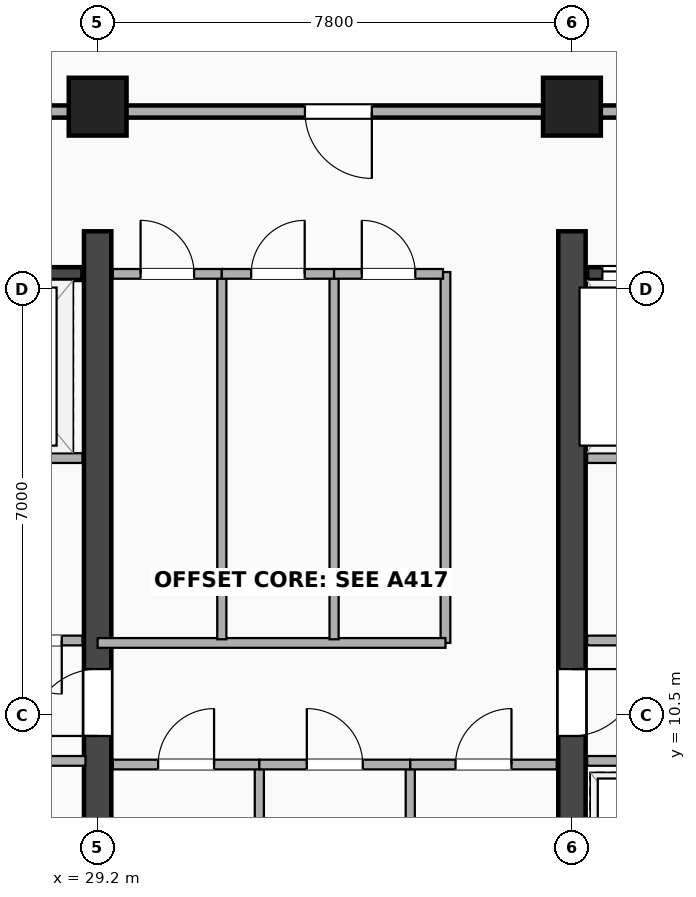
"""IFC4 building model, lengths in metres.
Left out: names, types, materials, properties, quantities, classifications, styles, units other than length and angle.
Written with IfcOpenShell. Run it as: python <this file> out.ifc"""

import sys

from ifc_helpers import new_model, si_unit, direction, frame, frame_2d, origin, origin_2d, place, context, subcontext, project, spatial, rectangle, extrude, element, fill, save


model = new_model("IFC4")
c1 = context("Model", 3, precision=1e-05, world=origin(), true_north=direction((0.0, 1.0)))
c2 = subcontext(c1, "Body", "Model", "MODEL_VIEW")
j1 = project(units=[si_unit("LENGTHUNIT", "METRE"), si_unit("PLANEANGLEUNIT", "RADIAN")], contexts=[c1])
p1 = place(None, origin())
s1 = spatial("IfcSite", under=j1, at=p1, CompositionType="ELEMENT")
p2 = place(p1, origin())
s2 = spatial("IfcBuilding", under=s1, at=p2, CompositionType="ELEMENT")
p3 = place(p2, frame((0.0, 0.0, 224.9)))
s3 = spatial("IfcBuildingStorey", under=s2, at=p3, CompositionType="ELEMENT", Elevation=224.9)
p4 = place(p3, frame((29.2, 3.5, 0.0), z_axis=(0.0, 0.0, 1.0), x_axis=(0.0, 1.0, 0.0)))
e1 = element("IfcWall", 1, at=p4, inside=s3, PredefinedType="SHEAR", context=c2, shape_type="SweptSolid", body=[
    extrude(rectangle(XDim=14.95, YDim=0.45, at=frame_2d((7.475, 0.0))), origin(), (0.0, 0.0, 1.0), 3.26),
])
p5 = place(p4, frame((7.75, 0.0, 0.0), z_axis=(0.0, 0.0, 1.0), x_axis=(-1.0, 0.0, 0.0)))
e2 = element("IfcOpeningElement", 2, at=p5, cuts=e1, PredefinedType="OPENING", context=c2, shape_type="SweptSolid", body=[
    extrude(rectangle(XDim=1.1, YDim=2.15, at=frame_2d((0.55, 1.075))), frame((0.0, 0.235, 0.0), z_axis=(0.0, -1.0, 0.0), x_axis=(1.0, 0.0, 0.0)), (0.0, 0.0, 1.0), 0.47),
])
p6 = place(p3, frame((37.0, 3.5, 0.0), z_axis=(0.0, 0.0, 1.0), x_axis=(0.0, 1.0, 0.0)))
e3 = element("IfcWall", 3, at=p6, inside=s3, PredefinedType="SHEAR", context=c2, shape_type="SweptSolid", body=[
    extrude(rectangle(XDim=14.95, YDim=0.45, at=frame_2d((7.475, 0.0))), origin(), (0.0, 0.0, 1.0), 3.26),
])
p7 = place(p6, frame((6.65, 0.0, 0.0)))
e4 = element("IfcOpeningElement", 4, at=p7, cuts=e3, PredefinedType="OPENING", context=c2, shape_type="SweptSolid", body=[
    extrude(rectangle(XDim=1.1, YDim=2.15, at=frame_2d((0.55, 1.075))), frame((0.0, 0.235, 0.0), z_axis=(0.0, -1.0, 0.0), x_axis=(1.0, 0.0, 0.0)), (0.0, 0.0, 1.0), 0.47),
])
p8 = place(p3, frame((20.65, 17.755, 0.0), z_axis=(0.0, 0.0, 1.0), x_axis=(1.0, 0.0, 0.0)))
e5 = element("IfcWall", 5, at=p8, inside=s3, PredefinedType="SHEAR", context=c2, shape_type="SweptSolid", body=[
    extrude(rectangle(XDim=8.3, YDim=0.21, at=frame_2d((4.15, 0.0))), origin(), (0.0, 0.0, 1.0), 3.26),
])
p9 = place(p8, frame((2.2, 0.0, 0.0), z_axis=(0.0, 0.0, 1.0), x_axis=(-1.0, 0.0, 0.0)))
e6 = element("IfcOpeningElement", 6, at=p9, cuts=e5, PredefinedType="OPENING", context=c2, shape_type="SweptSolid", body=[
    extrude(rectangle(XDim=1.05, YDim=2.15, at=frame_2d((0.525, 1.075))), frame((0.0, 0.115, 0.0), z_axis=(0.0, -1.0, 0.0), x_axis=(1.0, 0.0, 0.0)), (0.0, 0.0, 1.0), 0.23),
])
p10 = place(p8, frame((4.15, 0.0, 0.0)))
e7 = element("IfcOpeningElement", 7, at=p10, cuts=e5, PredefinedType="OPENING", context=c2, shape_type="SweptSolid", body=[
    extrude(rectangle(XDim=1.1, YDim=2.18, at=frame_2d((0.55, 1.09))), frame((0.0, 0.115, 0.0), z_axis=(0.0, -1.0, 0.0), x_axis=(1.0, 0.0, 0.0)), (0.0, 0.0, 1.0), 0.23),
])
p11 = place(p8, frame((6.45, 0.0, 0.0)))
e8 = element("IfcOpeningElement", 8, at=p11, cuts=e5, PredefinedType="OPENING", context=c2, shape_type="SweptSolid", body=[
    extrude(rectangle(XDim=1.12, YDim=2.2, at=frame_2d((0.56, 1.1))), frame((0.0, 0.115, 0.0), z_axis=(0.0, -1.0, 0.0), x_axis=(1.0, 0.0, 0.0)), (0.0, 0.0, 1.0), 0.23),
])
p12 = place(p3, frame((37.25, 17.755, 0.0), z_axis=(0.0, 0.0, 1.0), x_axis=(1.0, 0.0, 0.0)))
e9 = element("IfcWall", 9, at=p12, inside=s3, PredefinedType="SHEAR", context=c2, shape_type="SweptSolid", body=[
    extrude(rectangle(XDim=7.2, YDim=0.21, at=frame_2d((3.6, 0.0))), origin(), (0.0, 0.0, 1.0), 3.26),
])
p13 = place(p12, frame((0.25, 0.0, 0.0)))
e10 = element("IfcOpeningElement", 10, at=p13, cuts=e9, PredefinedType="OPENING", context=c2, shape_type="SweptSolid", body=[
    extrude(rectangle(XDim=1.12, YDim=2.2, at=frame_2d((0.56, 1.1))), frame((0.0, 0.115, 0.0), z_axis=(0.0, -1.0, 0.0), x_axis=(1.0, 0.0, 0.0)), (0.0, 0.0, 1.0), 0.23),
])
p14 = place(p12, frame((2.05, 0.0, 0.0)))
e11 = element("IfcOpeningElement", 11, at=p14, cuts=e9, PredefinedType="OPENING", context=c2, shape_type="SweptSolid", body=[
    extrude(rectangle(XDim=1.1, YDim=2.18, at=frame_2d((0.55, 1.09))), frame((0.0, 0.115, 0.0), z_axis=(0.0, -1.0, 0.0), x_axis=(1.0, 0.0, 0.0)), (0.0, 0.0, 1.0), 0.23),
])
p15 = place(p12, frame((5.78, 0.0, 0.0), z_axis=(0.0, 0.0, 1.0), x_axis=(-1.0, 0.0, 0.0)))
e12 = element("IfcOpeningElement", 12, at=p15, cuts=e9, PredefinedType="OPENING", context=c2, shape_type="SweptSolid", body=[
    extrude(rectangle(XDim=1.05, YDim=2.15, at=frame_2d((0.525, 1.075))), frame((0.0, 0.115, 0.0), z_axis=(0.0, -1.0, 0.0), x_axis=(1.0, 0.0, 0.0)), (0.0, 0.0, 1.0), 0.23),
])
for number, where, z_axis, x_axis in (
    (13, (29.2, 20.5, -0.24), (0.0, 0.0, 1.0), (1.0, 0.0, 0.0)),
    (14, (37.0, 20.5, -0.24), (0.0, 0.0, 1.0), (1.0, 0.0, 0.0)),
):
    element("IfcColumn", number, at=place(p3, frame(where, z_axis=z_axis, x_axis=x_axis)), inside=s3, PredefinedType="COLUMN", context=c2, shape_type="SweptSolid", body=[
        extrude(rectangle(XDim=0.95, YDim=0.95, at=origin_2d()), origin(), (0.0, 0.0, 1.0), 3.5),
    ])
p16 = place(p3, frame((24.22, 14.72, 0.0), z_axis=(0.0, 0.0, 1.0), x_axis=(1.0, 0.0, 0.0)))
e15 = element("IfcWall", 15, at=p16, inside=s3, PredefinedType="PARTITIONING", context=c2, shape_type="SweptSolid", body=[
    extrude(rectangle(XDim=4.73, YDim=0.16, at=frame_2d((2.365, 0.0))), origin(), (0.0, 0.0, 1.0), 3.26),
])
p17 = place(p3, frame((37.25, 14.72, 0.0), z_axis=(0.0, 0.0, 1.0), x_axis=(1.0, 0.0, 0.0)))
e16 = element("IfcWall", 16, at=p17, inside=s3, PredefinedType="PARTITIONING", context=c2, shape_type="SweptSolid", body=[
    extrude(rectangle(XDim=3.61, YDim=0.16, at=frame_2d((1.805, 0.0))), origin(), (0.0, 0.0, 1.0), 3.26),
])
p18 = place(p3, frame((26.38, 20.42, 0.0), z_axis=(0.0, 0.0, 1.0), x_axis=(1.0, 0.0, 0.0)))
e17 = element("IfcWall", 17, at=p18, inside=s3, PredefinedType="PARTITIONING", context=c2, shape_type="SweptSolid", body=[
    extrude(rectangle(XDim=2.82, YDim=0.2, at=frame_2d((1.41, 0.0))), origin(), (0.0, 0.0, 1.0), 2.472),
])
p19 = place(p3, frame((29.2, 20.42, 0.0), z_axis=(0.0, 0.0, 1.0), x_axis=(1.0, 0.0, 0.0)))
e18 = element("IfcWall", 18, at=p19, inside=s3, PredefinedType="PARTITIONING", context=c2, shape_type="SweptSolid", body=[
    extrude(rectangle(XDim=7.8, YDim=0.2, at=frame_2d((3.9, 0.0))), origin(), (0.0, 0.0, 1.0), 2.472),
])
p20 = place(p19, frame((3.409, 0.0, 0.0)))
e19 = element("IfcOpeningElement", 19, at=p20, cuts=e18, PredefinedType="OPENING", context=c2, shape_type="SweptSolid", body=[
    extrude(rectangle(XDim=1.1, YDim=2.15, at=frame_2d((0.55, 1.075))), frame((0.0, 0.11, 0.0), z_axis=(0.0, -1.0, 0.0), x_axis=(1.0, 0.0, 0.0)), (0.0, 0.0, 1.0), 0.22),
])
p21 = place(p3, frame((37.0, 20.42, 0.0), z_axis=(0.0, 0.0, 1.0), x_axis=(1.0, 0.0, 0.0)))
e20 = element("IfcWall", 20, at=p21, inside=s3, PredefinedType="PARTITIONING", context=c2, shape_type="SweptSolid", body=[
    extrude(rectangle(XDim=7.45, YDim=0.2, at=frame_2d((3.725, 0.0))), origin(), (0.0, 0.0, 1.0), 2.472),
])
p22 = place(p21, frame((4.2, 0.0, 0.0)))
e21 = element("IfcOpeningElement", 21, at=p22, cuts=e20, PredefinedType="OPENING", context=c2, shape_type="SweptSolid", body=[
    extrude(rectangle(XDim=1.1, YDim=2.15, at=frame_2d((0.55, 1.075))), frame((0.0, 0.11, 0.0), z_axis=(0.0, -1.0, 0.0), x_axis=(1.0, 0.0, 0.0)), (0.0, 0.0, 1.0), 0.22),
])
p23 = place(p3, frame((27.389, 11.72, 0.0), z_axis=(0.0, 0.0, 1.0), x_axis=(1.0, 0.0, 0.0)))
e22 = element("IfcWall", 22, at=p23, inside=s3, PredefinedType="PARTITIONING", context=c2, shape_type="SweptSolid", body=[
    extrude(rectangle(XDim=1.561, YDim=0.16, at=frame_2d((0.78, 0.0))), origin(), (0.0, 0.0, 1.0), 3.26),
])
p24 = place(p23, frame((0.341, 0.0, 0.0)))
e23 = element("IfcOpeningElement", 23, at=p24, cuts=e22, PredefinedType="OPENING", context=c2, shape_type="SweptSolid", body=[
    extrude(rectangle(XDim=0.88, YDim=2.08, at=frame_2d((0.44, 1.04))), frame((0.0, 0.09, 0.0), z_axis=(0.0, -1.0, 0.0), x_axis=(1.0, 0.0, 0.0)), (0.0, 0.0, 1.0), 0.18),
])
p25 = place(p3, frame((37.25, 11.72, 0.0), z_axis=(0.0, 0.0, 1.0), x_axis=(1.0, 0.0, 0.0)))
e24 = element("IfcWall", 24, at=p25, inside=s3, PredefinedType="PARTITIONING", context=c2, shape_type="SweptSolid", body=[
    extrude(rectangle(XDim=3.61, YDim=0.16, at=frame_2d((1.805, 0.0))), origin(), (0.0, 0.0, 1.0), 3.26),
])
p26 = place(p25, frame((1.345, 0.0, 0.0)))
e25 = element("IfcOpeningElement", 25, at=p26, cuts=e24, PredefinedType="OPENING", context=c2, shape_type="SweptSolid", body=[
    extrude(rectangle(XDim=0.92, YDim=2.08, at=frame_2d((0.46, 1.04))), frame((0.0, 0.09, 0.0), z_axis=(0.0, -1.0, 0.0), x_axis=(1.0, 0.0, 0.0)), (0.0, 0.0, 1.0), 0.18),
])
p27 = place(p3, frame((24.2, 9.74, 0.0), z_axis=(0.0, 0.0, 1.0), x_axis=(1.0, 0.0, 0.0)))
e26 = element("IfcWall", 26, at=p27, inside=s3, PredefinedType="PARTITIONING", context=c2, shape_type="SweptSolid", body=[
    extrude(rectangle(XDim=4.8, YDim=0.16, at=frame_2d((2.4, 0.0))), origin(), (0.0, 0.0, 1.0), 3.26),
])
p28 = place(p27, frame((1.85, 0.0, 0.0)))
e27 = element("IfcOpeningElement", 27, at=p28, cuts=e26, PredefinedType="OPENING", context=c2, shape_type="SweptSolid", body=[
    extrude(rectangle(XDim=1.1, YDim=2.15, at=frame_2d((0.55, 1.075))), frame((0.0, 0.09, 0.0), z_axis=(0.0, -1.0, 0.0), x_axis=(1.0, 0.0, 0.0)), (0.0, 0.0, 1.0), 0.18),
])
p29 = place(p3, frame((37.25, 9.74, 0.0), z_axis=(0.0, 0.0, 1.0), x_axis=(1.0, 0.0, 0.0)))
e28 = element("IfcWall", 28, at=p29, inside=s3, PredefinedType="PARTITIONING", context=c2, shape_type="SweptSolid", body=[
    extrude(rectangle(XDim=2.17, YDim=0.16, at=frame_2d((1.085, 0.0))), origin(), (0.0, 0.0, 1.0), 3.26),
])
p30 = place(p3, frame((34.92, 11.68, 0.0), z_axis=(0.0, 0.0, 1.0), x_axis=(0.0, 1.0, 0.0)))
e29 = element("IfcWall", 29, at=p30, inside=s3, PredefinedType="PARTITIONING", context=c2, shape_type="SweptSolid", body=[
    extrude(rectangle(XDim=6.1, YDim=0.16, at=frame_2d((3.05, 0.0))), origin(), (0.0, 0.0, 1.0), 3.26),
])
p31 = place(p3, frame((31.859, 3.95, 0.0), z_axis=(0.0, 0.0, 1.0), x_axis=(0.0, 1.0, 0.0)))
e30 = element("IfcWall", 30, at=p31, inside=s3, PredefinedType="PARTITIONING", context=c2, shape_type="SweptSolid", body=[
    extrude(rectangle(XDim=5.73, YDim=0.15, at=frame_2d((2.865, 0.0))), origin(), (0.0, 0.0, 1.0), 3.26),
])
p32 = place(p3, frame((29.45, 9.68, 0.0), z_axis=(0.0, 0.0, 1.0), x_axis=(1.0, 0.0, 0.0)))
e31 = element("IfcWall", 31, at=p32, inside=s3, PredefinedType="PARTITIONING", context=c2, shape_type="SweptSolid", body=[
    extrude(rectangle(XDim=2.409, YDim=0.16, at=frame_2d((1.205, 0.0))), origin(), (0.0, 0.0, 1.0), 3.26),
])
p33 = place(p32, frame((1.664, 0.0, 0.0), z_axis=(0.0, 0.0, 1.0), x_axis=(-1.0, 0.0, 0.0)))
e32 = element("IfcOpeningElement", 32, at=p33, cuts=e31, PredefinedType="OPENING", context=c2, shape_type="SweptSolid", body=[
    extrude(rectangle(XDim=0.92, YDim=2.08, at=frame_2d((0.46, 1.04))), frame((0.0, 0.09, 0.0), z_axis=(0.0, -1.0, 0.0), x_axis=(1.0, 0.0, 0.0)), (0.0, 0.0, 1.0), 0.18),
])
p34 = place(p3, frame((34.341, 3.95, 0.0), z_axis=(0.0, 0.0, 1.0), x_axis=(0.0, 1.0, 0.0)))
e33 = element("IfcWall", 33, at=p34, inside=s3, PredefinedType="PARTITIONING", context=c2, shape_type="SweptSolid", body=[
    extrude(rectangle(XDim=5.73, YDim=0.15, at=frame_2d((2.865, 0.0))), origin(), (0.0, 0.0, 1.0), 3.26),
])
p35 = place(p3, frame((31.859, 9.68, 0.0), z_axis=(0.0, 0.0, 1.0), x_axis=(1.0, 0.0, 0.0)))
e34 = element("IfcWall", 34, at=p35, inside=s3, PredefinedType="PARTITIONING", context=c2, shape_type="SweptSolid", body=[
    extrude(rectangle(XDim=2.482, YDim=0.16, at=frame_2d((1.241, 0.0))), origin(), (0.0, 0.0, 1.0), 3.26),
])
p36 = place(p35, frame((1.701, 0.0, 0.0), z_axis=(0.0, 0.0, 1.0), x_axis=(-1.0, 0.0, 0.0)))
e35 = element("IfcOpeningElement", 35, at=p36, cuts=e34, PredefinedType="OPENING", context=c2, shape_type="SweptSolid", body=[
    extrude(rectangle(XDim=0.92, YDim=2.08, at=frame_2d((0.46, 1.04))), frame((0.0, 0.09, 0.0), z_axis=(0.0, -1.0, 0.0), x_axis=(1.0, 0.0, 0.0)), (0.0, 0.0, 1.0), 0.18),
])
p37 = place(p3, frame((34.341, 9.68, 0.0), z_axis=(0.0, 0.0, 1.0), x_axis=(1.0, 0.0, 0.0)))
e36 = element("IfcWall", 36, at=p37, inside=s3, PredefinedType="PARTITIONING", context=c2, shape_type="SweptSolid", body=[
    extrude(rectangle(XDim=2.409, YDim=0.16, at=frame_2d((1.205, 0.0))), origin(), (0.0, 0.0, 1.0), 3.26),
])
p38 = place(p37, frame((1.664, 0.0, 0.0), z_axis=(0.0, 0.0, 1.0), x_axis=(-1.0, 0.0, 0.0)))
e37 = element("IfcOpeningElement", 37, at=p38, cuts=e36, PredefinedType="OPENING", context=c2, shape_type="SweptSolid", body=[
    extrude(rectangle(XDim=0.92, YDim=2.08, at=frame_2d((0.46, 1.04))), frame((0.0, 0.09, 0.0), z_axis=(0.0, -1.0, 0.0), x_axis=(1.0, 0.0, 0.0)), (0.0, 0.0, 1.0), 0.18),
])
p39 = place(p3, frame((29.2, 11.68, 0.0), z_axis=(0.0, 0.0, 1.0), x_axis=(1.0, 0.0, 0.0)))
e38 = element("IfcWall", 38, at=p39, inside=s3, PredefinedType="PARTITIONING", context=c2, shape_type="SweptSolid", body=[
    extrude(rectangle(XDim=5.72, YDim=0.16, at=frame_2d((2.86, 0.0))), origin(), (0.0, 0.0, 1.0), 3.26),
])
p40 = place(p3, frame((31.242, 11.74, 0.0), z_axis=(0.0, 0.0, 1.0), x_axis=(0.0, 1.0, 0.0)))
e39 = element("IfcWall", 39, at=p40, inside=s3, PredefinedType="PARTITIONING", context=c2, shape_type="SweptSolid", body=[
    extrude(rectangle(XDim=6.01, YDim=0.15, at=frame_2d((3.005, 0.0))), origin(), (0.0, 0.0, 1.0), 3.26),
])
p41 = place(p3, frame((29.45, 17.75, 0.0), z_axis=(0.0, 0.0, 1.0), x_axis=(1.0, 0.0, 0.0)))
e40 = element("IfcWall", 40, at=p41, inside=s3, PredefinedType="PARTITIONING", context=c2, shape_type="SweptSolid", body=[
    extrude(rectangle(XDim=1.792, YDim=0.16, at=frame_2d((0.896, 0.0))), origin(), (0.0, 0.0, 1.0), 3.26),
])
p42 = place(p41, frame((1.336, 0.0, 0.0), z_axis=(0.0, 0.0, 1.0), x_axis=(-1.0, 0.0, 0.0)))
e41 = element("IfcOpeningElement", 41, at=p42, cuts=e40, PredefinedType="OPENING", context=c2, shape_type="SweptSolid", body=[
    extrude(rectangle(XDim=0.88, YDim=2.08, at=frame_2d((0.44, 1.04))), frame((0.0, 0.09, 0.0), z_axis=(0.0, -1.0, 0.0), x_axis=(1.0, 0.0, 0.0)), (0.0, 0.0, 1.0), 0.18),
])
p43 = place(p3, frame((33.088, 11.74, 0.0), z_axis=(0.0, 0.0, 1.0), x_axis=(0.0, 1.0, 0.0)))
e42 = element("IfcWall", 42, at=p43, inside=s3, PredefinedType="PARTITIONING", context=c2, shape_type="SweptSolid", body=[
    extrude(rectangle(XDim=6.01, YDim=0.15, at=frame_2d((3.005, 0.0))), origin(), (0.0, 0.0, 1.0), 3.26),
])
p44 = place(p3, frame((31.242, 17.75, 0.0), z_axis=(0.0, 0.0, 1.0), x_axis=(1.0, 0.0, 0.0)))
e43 = element("IfcWall", 43, at=p44, inside=s3, PredefinedType="PARTITIONING", context=c2, shape_type="SweptSolid", body=[
    extrude(rectangle(XDim=1.846, YDim=0.16, at=frame_2d((0.923, 0.0))), origin(), (0.0, 0.0, 1.0), 3.26),
])
p45 = place(p44, frame((1.363, 0.0, 0.0), z_axis=(0.0, 0.0, 1.0), x_axis=(-1.0, 0.0, 0.0)))
e44 = element("IfcOpeningElement", 44, at=p45, cuts=e43, PredefinedType="OPENING", context=c2, shape_type="SweptSolid", body=[
    extrude(rectangle(XDim=0.88, YDim=2.08, at=frame_2d((0.44, 1.04))), frame((0.0, 0.09, 0.0), z_axis=(0.0, -1.0, 0.0), x_axis=(1.0, 0.0, 0.0)), (0.0, 0.0, 1.0), 0.18),
])
p46 = place(p3, frame((33.088, 17.75, 0.0), z_axis=(0.0, 0.0, 1.0), x_axis=(1.0, 0.0, 0.0)))
e45 = element("IfcWall", 45, at=p46, inside=s3, PredefinedType="PARTITIONING", context=c2, shape_type="SweptSolid", body=[
    extrude(rectangle(XDim=1.792, YDim=0.16, at=frame_2d((0.896, 0.0))), origin(), (0.0, 0.0, 1.0), 3.26),
])
p47 = place(p46, frame((1.336, 0.0, 0.0), z_axis=(0.0, 0.0, 1.0), x_axis=(-1.0, 0.0, 0.0)))
e46 = element("IfcOpeningElement", 46, at=p47, cuts=e45, PredefinedType="OPENING", context=c2, shape_type="SweptSolid", body=[
    extrude(rectangle(XDim=0.88, YDim=2.08, at=frame_2d((0.44, 1.04))), frame((0.0, 0.09, 0.0), z_axis=(0.0, -1.0, 0.0), x_axis=(1.0, 0.0, 0.0)), (0.0, 0.0, 1.0), 0.18),
])
p48 = place(p13, origin())
e47 = element("IfcDoor", 47, at=p48, inside=s3, OperationType="DOUBLE_DOOR_SLIDING", PredefinedType="DOOR", context=c2, shape_type="SweptSolid", body=[
    extrude(rectangle(XDim=1.12, YDim=2.2, at=frame_2d((0.56, 1.1))), frame((0.0, 0.025, 0.0), z_axis=(0.0, -1.0, 0.0), x_axis=(1.0, 0.0, 0.0)), (0.0, 0.0, 1.0), 0.05),
])
fill(e10, e47)
p49 = place(p5, origin())
e48 = element("IfcDoor", 48, at=p49, inside=s3, OperationType="SINGLE_SWING_LEFT", PredefinedType="DOOR", context=c2, shape_type="SweptSolid", body=[
    extrude(rectangle(XDim=1.1, YDim=2.15, at=frame_2d((0.55, 1.075))), frame((0.0, 0.025, 0.0), z_axis=(0.0, -1.0, 0.0), x_axis=(1.0, 0.0, 0.0)), (0.0, 0.0, 1.0), 0.05),
])
fill(e2, e48)
p50 = place(p7, origin())
e49 = element("IfcDoor", 49, at=p50, inside=s3, OperationType="SINGLE_SWING_RIGHT", PredefinedType="DOOR", context=c2, shape_type="SweptSolid", body=[
    extrude(rectangle(XDim=1.1, YDim=2.15, at=frame_2d((0.55, 1.075))), frame((0.0, 0.025, 0.0), z_axis=(0.0, -1.0, 0.0), x_axis=(1.0, 0.0, 0.0)), (0.0, 0.0, 1.0), 0.05),
])
fill(e4, e49)
p51 = place(p20, origin())
e50 = element("IfcDoor", 50, at=p51, inside=s3, OperationType="SINGLE_SWING_RIGHT", PredefinedType="DOOR", context=c2, shape_type="SweptSolid", body=[
    extrude(rectangle(XDim=1.1, YDim=2.15, at=frame_2d((0.55, 1.075))), frame((0.0, 0.025, 0.0), z_axis=(0.0, -1.0, 0.0), x_axis=(1.0, 0.0, 0.0)), (0.0, 0.0, 1.0), 0.05),
])
fill(e19, e50)
p52 = place(p24, origin())
e51 = element("IfcDoor", 51, at=p52, inside=s3, OperationType="SINGLE_SWING_RIGHT", PredefinedType="DOOR", context=c2, shape_type="SweptSolid", body=[
    extrude(rectangle(XDim=0.88, YDim=2.08, at=frame_2d((0.44, 1.04))), frame((0.0, 0.025, 0.0), z_axis=(0.0, -1.0, 0.0), x_axis=(1.0, 0.0, 0.0)), (0.0, 0.0, 1.0), 0.05),
])
fill(e23, e51)
p53 = place(p33, origin())
e52 = element("IfcDoor", 52, at=p53, inside=s3, OperationType="SINGLE_SWING_RIGHT", PredefinedType="DOOR", context=c2, shape_type="SweptSolid", body=[
    extrude(rectangle(XDim=0.92, YDim=2.08, at=frame_2d((0.46, 1.04))), frame((0.0, 0.025, 0.0), z_axis=(0.0, -1.0, 0.0), x_axis=(1.0, 0.0, 0.0)), (0.0, 0.0, 1.0), 0.05),
])
fill(e32, e52)
p54 = place(p36, origin())
e53 = element("IfcDoor", 53, at=p54, inside=s3, OperationType="SINGLE_SWING_LEFT", PredefinedType="DOOR", context=c2, shape_type="SweptSolid", body=[
    extrude(rectangle(XDim=0.92, YDim=2.08, at=frame_2d((0.46, 1.04))), frame((0.0, 0.025, 0.0), z_axis=(0.0, -1.0, 0.0), x_axis=(1.0, 0.0, 0.0)), (0.0, 0.0, 1.0), 0.05),
])
fill(e35, e53)
p55 = place(p38, origin())
e54 = element("IfcDoor", 54, at=p55, inside=s3, OperationType="SINGLE_SWING_RIGHT", PredefinedType="DOOR", context=c2, shape_type="SweptSolid", body=[
    extrude(rectangle(XDim=0.92, YDim=2.08, at=frame_2d((0.46, 1.04))), frame((0.0, 0.025, 0.0), z_axis=(0.0, -1.0, 0.0), x_axis=(1.0, 0.0, 0.0)), (0.0, 0.0, 1.0), 0.05),
])
fill(e37, e54)
p56 = place(p42, origin())
e55 = element("IfcDoor", 55, at=p56, inside=s3, OperationType="SINGLE_SWING_LEFT", PredefinedType="DOOR", context=c2, shape_type="SweptSolid", body=[
    extrude(rectangle(XDim=0.88, YDim=2.08, at=frame_2d((0.44, 1.04))), frame((0.0, 0.025, 0.0), z_axis=(0.0, -1.0, 0.0), x_axis=(1.0, 0.0, 0.0)), (0.0, 0.0, 1.0), 0.05),
])
fill(e41, e55)
p57 = place(p45, origin())
e56 = element("IfcDoor", 56, at=p57, inside=s3, OperationType="SINGLE_SWING_RIGHT", PredefinedType="DOOR", context=c2, shape_type="SweptSolid", body=[
    extrude(rectangle(XDim=0.88, YDim=2.08, at=frame_2d((0.44, 1.04))), frame((0.0, 0.025, 0.0), z_axis=(0.0, -1.0, 0.0), x_axis=(1.0, 0.0, 0.0)), (0.0, 0.0, 1.0), 0.05),
])
fill(e44, e56)
p58 = place(p47, origin())
e57 = element("IfcDoor", 57, at=p58, inside=s3, OperationType="SINGLE_SWING_LEFT", PredefinedType="DOOR", context=c2, shape_type="SweptSolid", body=[
    extrude(rectangle(XDim=0.88, YDim=2.08, at=frame_2d((0.44, 1.04))), frame((0.0, 0.025, 0.0), z_axis=(0.0, -1.0, 0.0), x_axis=(1.0, 0.0, 0.0)), (0.0, 0.0, 1.0), 0.05),
])
fill(e46, e57)
save(model, sys.argv[1])
